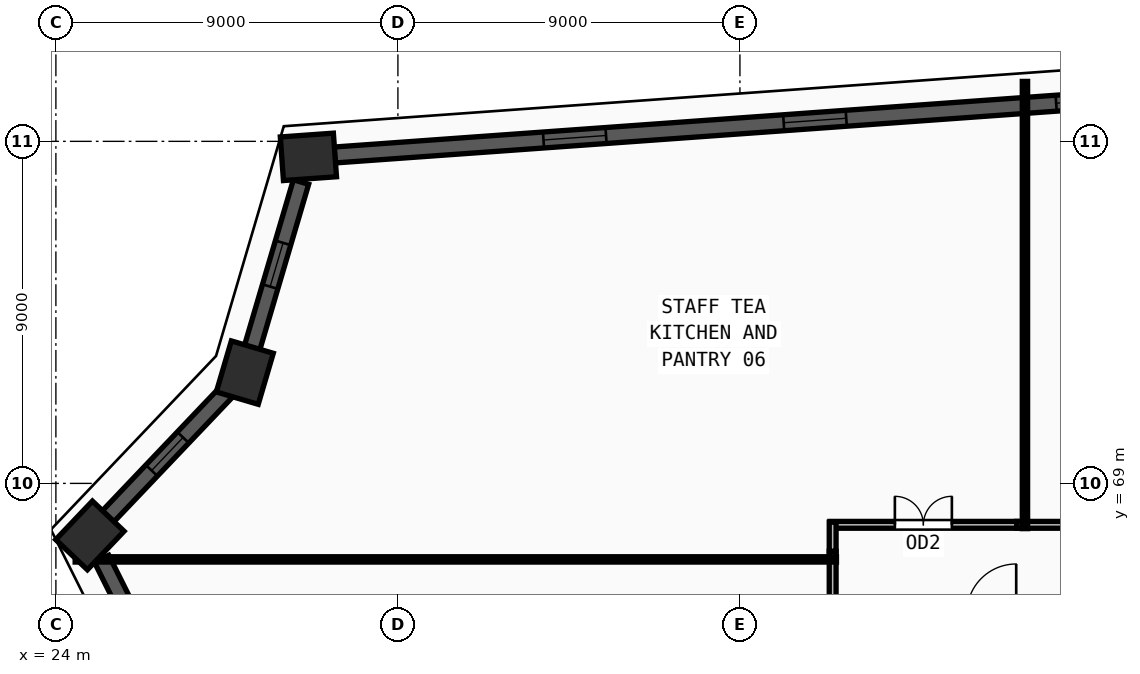
"""IFC4 building model, lengths in metres.
Left out: names, types, materials, properties, quantities, classifications, styles, units other than length and angle.
Written with IfcOpenShell. Run it as: python <this file> out.ifc"""

import sys

from ifc_helpers import new_model, si_unit, direction, frame, frame_2d, origin, origin_2d, place, context, subcontext, project, spatial, rectangle, extrude, source, transform, mapped, element, fill, save


model = new_model("IFC4")
c1 = context("Model", 3, precision=1e-05, world=origin(), true_north=direction((0.0, 1.0)))
c2 = subcontext(c1, "Body", "Model", "MODEL_VIEW")
j1 = project(units=[si_unit("LENGTHUNIT", "METRE"), si_unit("PLANEANGLEUNIT", "RADIAN")], contexts=[c1])
p1 = place(None, origin())
s1 = spatial("IfcSite", under=j1, at=p1, CompositionType="ELEMENT")
p2 = place(p1, origin())
s2 = spatial("IfcBuilding", under=s1, at=p2, CompositionType="ELEMENT")
p3 = place(p2, frame((0.0, 0.0, 155.25)))
s3 = spatial("IfcBuildingStorey", under=s2, at=p3, CompositionType="ELEMENT", Elevation=155.25)
m1 = source(origin(), c2, "Body", "SweptSolid", [
    extrude(rectangle(XDim=1.4, YDim=1.15, at=origin_2d()), origin(), (0.0, 0.0, 1.0), 3.75),
])
for number, where, z_axis, x_axis in (
    (1, (24.895, 67.631, 0.0), (0.0, 0.0, 1.0), (0.689, 0.724, 0.0)),
    (2, (28.971, 71.915, 0.0), (0.0, 0.0, 1.0), (0.283, 0.959, 0.0)),
    (3, (30.645, 77.592, 0.0), (0.0, 0.0, 1.0), (0.997, 0.071, 0.0)),
):
    element("IfcColumn", number, at=place(p3, frame(where, z_axis=z_axis, x_axis=x_axis)), inside=s3, PredefinedType="COLUMN", context=c2, shape_type="MappedRepresentation", body=[
        mapped(m1, transform((0.0, 0.0, 0.0), x_axis=(1.0, 0.0, 0.0), y_axis=(0.0, 1.0, 0.0), z_axis=(0.0, 0.0, 1.0), scale=1.0)),
    ])
p4 = place(p3, frame((56.617, 79.456, 0.0), z_axis=(0.0, 0.0, 1.0), x_axis=(-0.997433557859, -0.071598167967, 0.0)))
e4 = element("IfcWall", 4, at=p4, inside=s3, PredefinedType="SOLIDWALL", context=c2, shape_type="SweptSolid", body=[
    extrude(rectangle(XDim=25.349, YDim=0.42, at=frame_2d((12.674, 0.0))), origin(), (0.0, 0.0, 1.0), 3.57),
])
m2 = source(origin(), c2, "Body", "SweptSolid", [
    extrude(rectangle(XDim=1.65, YDim=1.95, at=frame_2d((0.825, 0.975))), frame((0.0, 0.22, 0.0), z_axis=(0.0, -1.0, 0.0), x_axis=(1.0, 0.0, 0.0)), (0.0, 0.0, 1.0), 0.44),
])
p5 = place(p4, frame((4.662, 0.0, 0.55)))
e5 = element("IfcOpeningElement", 5, at=p5, cuts=e4, PredefinedType="OPENING", context=c2, shape_type="MappedRepresentation", body=[
    mapped(m2, transform((0.0, 0.0, 0.0), x_axis=(1.0, 0.0, 0.0), y_axis=(0.0, 1.0, 0.0), z_axis=(0.0, 0.0, 1.0), scale=1.0)),
])
p6 = place(p4, frame((11.85, 0.0, 0.55)))
e6 = element("IfcOpeningElement", 6, at=p6, cuts=e4, PredefinedType="OPENING", context=c2, shape_type="MappedRepresentation", body=[
    mapped(m2, transform((0.0, 0.0, 0.0), x_axis=(1.0, 0.0, 0.0), y_axis=(0.0, 1.0, 0.0), z_axis=(0.0, 0.0, 1.0), scale=1.0)),
])
p7 = place(p4, frame((18.187, 0.0, 0.55)))
e7 = element("IfcOpeningElement", 7, at=p7, cuts=e4, PredefinedType="OPENING", context=c2, shape_type="MappedRepresentation", body=[
    mapped(m2, transform((0.0, 0.0, 0.0), x_axis=(1.0, 0.0, 0.0), y_axis=(0.0, 1.0, 0.0), z_axis=(0.0, 0.0, 1.0), scale=1.0)),
])
p8 = place(p3, frame((30.45, 76.93, 0.0), z_axis=(0.0, 0.0, 1.0), x_axis=(-0.282903082649, -0.959148500404, 0.0)))
e8 = element("IfcWall", 8, at=p8, inside=s3, PredefinedType="SOLIDWALL", context=c2, shape_type="SweptSolid", body=[
    extrude(rectangle(XDim=4.538, YDim=0.42, at=frame_2d((2.269, 0.0))), origin(), (0.0, 0.0, 1.0), 3.57),
])
m3 = source(origin(), c2, "Body", "SweptSolid", [
    extrude(rectangle(XDim=1.2, YDim=1.9, at=frame_2d((0.6, 0.95))), frame((0.0, 0.22, 0.0), z_axis=(0.0, -1.0, 0.0), x_axis=(1.0, 0.0, 0.0)), (0.0, 0.0, 1.0), 0.44),
])
p9 = place(p8, frame((1.669, 0.0, 0.55)))
e9 = element("IfcOpeningElement", 9, at=p9, cuts=e8, PredefinedType="OPENING", context=c2, shape_type="MappedRepresentation", body=[
    mapped(m3, transform((0.0, 0.0, 0.0), x_axis=(1.0, 0.0, 0.0), y_axis=(0.0, 1.0, 0.0), z_axis=(0.0, 0.0, 1.0), scale=1.0)),
])
p10 = place(p3, frame((28.495, 71.415, 0.0), z_axis=(0.0, 0.0, 1.0), x_axis=(-0.68924618139, -0.724527226155, 0.0)))
e10 = element("IfcWall", 10, at=p10, inside=s3, PredefinedType="SOLIDWALL", context=c2, shape_type="SweptSolid", body=[
    extrude(rectangle(XDim=4.532, YDim=0.42, at=frame_2d((2.266, 0.0))), origin(), (0.0, 0.0, 1.0), 3.57),
])
p11 = place(p10, frame((1.666, 0.0, 0.55)))
e11 = element("IfcOpeningElement", 11, at=p11, cuts=e10, PredefinedType="OPENING", context=c2, shape_type="MappedRepresentation", body=[
    mapped(m3, transform((0.0, 0.0, 0.0), x_axis=(1.0, 0.0, 0.0), y_axis=(0.0, 1.0, 0.0), z_axis=(0.0, 0.0, 1.0), scale=1.0)),
])
p12 = place(p3, frame((25.204, 67.014, 0.0), z_axis=(0.0, 0.0, 1.0), x_axis=(0.447340705753, -0.894363624583, 0.0)))
e12 = element("IfcWall", 12, at=p12, inside=s3, PredefinedType="SOLIDWALL", context=c2, shape_type="SweptSolid", body=[
    extrude(rectangle(XDim=30.73, YDim=0.42, at=frame_2d((15.365, 0.0))), origin(), (0.0, 0.0, 1.0), 3.57),
])
p13 = place(p12, frame((7.708, 0.0, 0.55)))
e13 = element("IfcOpeningElement", 13, at=p13, cuts=e12, PredefinedType="OPENING", context=c2, shape_type="MappedRepresentation", body=[
    mapped(m2, transform((0.0, 0.0, 0.0), x_axis=(1.0, 0.0, 0.0), y_axis=(0.0, 1.0, 0.0), z_axis=(0.0, 0.0, 1.0), scale=1.0)),
])
p14 = place(p12, frame((16.09, 0.0, 0.55)))
e14 = element("IfcOpeningElement", 14, at=p14, cuts=e12, PredefinedType="OPENING", context=c2, shape_type="MappedRepresentation", body=[
    mapped(m2, transform((0.0, 0.0, 0.0), x_axis=(1.0, 0.0, 0.0), y_axis=(0.0, 1.0, 0.0), z_axis=(0.0, 0.0, 1.0), scale=1.0)),
])
p15 = place(p12, frame((21.373, 0.0, 0.55)))
e15 = element("IfcOpeningElement", 15, at=p15, cuts=e12, PredefinedType="OPENING", context=c2, shape_type="MappedRepresentation", body=[
    mapped(m2, transform((0.0, 0.0, 0.0), x_axis=(1.0, 0.0, 0.0), y_axis=(0.0, 1.0, 0.0), z_axis=(0.0, 0.0, 1.0), scale=1.0)),
])
p16 = place(p3, frame((49.285, 67.91, 0.0), z_axis=(0.0, 0.0, 1.0), x_axis=(1.0, 0.0, 0.0)))
e16 = element("IfcWall", 16, at=p16, inside=s3, PredefinedType="PARTITIONING", context=c2, shape_type="SweptSolid", body=[
    extrude(rectangle(XDim=8.0, YDim=0.18, at=frame_2d((4.0, 0.0))), origin(), (0.0, 0.0, 1.0), 3.57),
])
m4 = source(origin(), c2, "Body", "SweptSolid", [
    extrude(rectangle(XDim=1.0, YDim=2.2, at=frame_2d((0.5, 1.1))), frame((0.0, 0.1, 0.0), z_axis=(0.0, -1.0, 0.0), x_axis=(1.0, 0.0, 0.0)), (0.0, 0.0, 1.0), 0.2),
])
p17 = place(p16, frame((3.5, 0.0, 0.0)))
e17 = element("IfcOpeningElement", 17, at=p17, cuts=e16, PredefinedType="OPENING", context=c2, shape_type="MappedRepresentation", body=[
    mapped(m4, transform((0.0, 0.0, 0.0), x_axis=(1.0, 0.0, 0.0), y_axis=(0.0, 1.0, 0.0), z_axis=(0.0, 0.0, 1.0), scale=1.0)),
])
p18 = place(p3, frame((44.37, 67.91, 0.0), z_axis=(0.0, 0.0, 1.0), x_axis=(1.0, 0.0, 0.0)))
e18 = element("IfcWall", 18, at=p18, inside=s3, PredefinedType="PARTITIONING", context=c2, shape_type="SweptSolid", body=[
    extrude(rectangle(XDim=4.915, YDim=0.18, at=frame_2d((2.458, 0.0))), origin(), (0.0, 0.0, 1.0), 3.57),
])
m5 = source(origin(), c2, "Body", "SweptSolid", [
    extrude(rectangle(XDim=1.5, YDim=2.2, at=frame_2d((0.75, 1.1))), frame((0.0, 0.1, 0.0), z_axis=(0.0, -1.0, 0.0), x_axis=(1.0, 0.0, 0.0)), (0.0, 0.0, 1.0), 0.2),
])
p19 = place(p18, frame((1.707, 0.0, 0.0)))
e19 = element("IfcOpeningElement", 19, at=p19, cuts=e18, PredefinedType="OPENING", context=c2, shape_type="MappedRepresentation", body=[
    mapped(m5, transform((0.0, 0.0, 0.0), x_axis=(1.0, 0.0, 0.0), y_axis=(0.0, 1.0, 0.0), z_axis=(0.0, 0.0, 1.0), scale=1.0)),
])
p20 = place(p3, frame((44.44, 60.785, 0.0), z_axis=(0.0, 0.0, 1.0), x_axis=(0.0, 1.0, 0.0)))
e20 = element("IfcWall", 20, at=p20, inside=s3, PredefinedType="PARTITIONING", context=c2, shape_type="SweptSolid", body=[
    extrude(rectangle(XDim=6.43, YDim=0.18, at=frame_2d((3.215, 0.0))), origin(), (0.0, 0.0, 1.0), 3.57),
])
p21 = place(p20, frame((2.715, 0.0, 0.0)))
e21 = element("IfcOpeningElement", 21, at=p21, cuts=e20, PredefinedType="OPENING", context=c2, shape_type="MappedRepresentation", body=[
    mapped(m4, transform((0.0, 0.0, 0.0), x_axis=(1.0, 0.0, 0.0), y_axis=(0.0, 1.0, 0.0), z_axis=(0.0, 0.0, 1.0), scale=1.0)),
])
p22 = place(p3, frame((44.44, 67.215, 0.0), z_axis=(0.0, 0.0, 1.0), x_axis=(0.0, 1.0, 0.0)))
e22 = element("IfcWall", 22, at=p22, inside=s3, PredefinedType="PARTITIONING", context=c2, shape_type="SweptSolid", body=[
    extrude(rectangle(XDim=0.765, YDim=0.18, at=frame_2d((0.382, 0.0))), origin(), (0.0, 0.0, 1.0), 3.57),
])
p23 = place(p3, frame((44.54, 67.0, 0.0), z_axis=(0.0, 0.0, 1.0), x_axis=(-1.0, 0.0, 0.0)))
e23 = element("IfcWall", 23, at=p23, inside=s3, PredefinedType="PARTITIONING", context=c2, shape_type="SweptSolid", body=[
    extrude(rectangle(XDim=20.033, YDim=0.14, at=frame_2d((10.017, 0.0))), origin(), (0.0, 0.0, 1.0), 2.755),
])
p24 = place(p3, frame((49.5, 67.81, 0.0), z_axis=(0.0, 0.0, 1.0), x_axis=(0.0, 1.0, 0.0)))
e24 = element("IfcWall", 24, at=p24, inside=s3, PredefinedType="PARTITIONING", context=c2, shape_type="SweptSolid", body=[
    extrude(rectangle(XDim=11.767, YDim=0.14, at=frame_2d((5.883, 0.0))), origin(), (0.0, 0.0, 1.0), 3.57),
])
m6 = source(origin(), c2, "Body", "SweptSolid", [
    extrude(rectangle(XDim=1.65, YDim=1.95, at=frame_2d((0.825, 0.975))), frame((0.0, 0.03, 0.0), z_axis=(0.0, -1.0, 0.0), x_axis=(1.0, 0.0, 0.0)), (0.0, 0.0, 1.0), 0.06),
])
p25 = place(p5, origin())
e25 = element("IfcWindow", 25, at=p25, inside=s3, PartitioningType="DOUBLE_PANEL_VERTICAL", PredefinedType="WINDOW", context=c2, shape_type="MappedRepresentation", body=[
    mapped(m6, transform((0.0, 0.0, 0.0), x_axis=(1.0, 0.0, 0.0), y_axis=(0.0, 1.0, 0.0), z_axis=(0.0, 0.0, 1.0), scale=1.0)),
])
fill(e5, e25)
p26 = place(p6, origin())
e26 = element("IfcWindow", 26, at=p26, inside=s3, PartitioningType="DOUBLE_PANEL_VERTICAL", PredefinedType="WINDOW", context=c2, shape_type="MappedRepresentation", body=[
    mapped(m6, transform((0.0, 0.0, 0.0), x_axis=(1.0, 0.0, 0.0), y_axis=(0.0, 1.0, 0.0), z_axis=(0.0, 0.0, 1.0), scale=1.0)),
])
fill(e6, e26)
p27 = place(p7, origin())
e27 = element("IfcWindow", 27, at=p27, inside=s3, PartitioningType="DOUBLE_PANEL_VERTICAL", PredefinedType="WINDOW", context=c2, shape_type="MappedRepresentation", body=[
    mapped(m6, transform((0.0, 0.0, 0.0), x_axis=(1.0, 0.0, 0.0), y_axis=(0.0, 1.0, 0.0), z_axis=(0.0, 0.0, 1.0), scale=1.0)),
])
fill(e7, e27)
m7 = source(origin(), c2, "Body", "SweptSolid", [
    extrude(rectangle(XDim=1.2, YDim=1.9, at=frame_2d((0.6, 0.95))), frame((0.0, 0.03, 0.0), z_axis=(0.0, -1.0, 0.0), x_axis=(1.0, 0.0, 0.0)), (0.0, 0.0, 1.0), 0.06),
])
p28 = place(p9, origin())
e28 = element("IfcWindow", 28, at=p28, inside=s3, PartitioningType="SINGLE_PANEL", PredefinedType="WINDOW", context=c2, shape_type="MappedRepresentation", body=[
    mapped(m7, transform((0.0, 0.0, 0.0), x_axis=(1.0, 0.0, 0.0), y_axis=(0.0, 1.0, 0.0), z_axis=(0.0, 0.0, 1.0), scale=1.0)),
])
fill(e9, e28)
p29 = place(p11, origin())
e29 = element("IfcWindow", 29, at=p29, inside=s3, PartitioningType="SINGLE_PANEL", PredefinedType="WINDOW", context=c2, shape_type="MappedRepresentation", body=[
    mapped(m7, transform((0.0, 0.0, 0.0), x_axis=(1.0, 0.0, 0.0), y_axis=(0.0, 1.0, 0.0), z_axis=(0.0, 0.0, 1.0), scale=1.0)),
])
fill(e11, e29)
m8 = source(origin(), c2, "Body", "SweptSolid", [
    extrude(rectangle(XDim=1.5, YDim=2.2, at=frame_2d((0.75, 1.1))), frame((0.0, 0.025, 0.0), z_axis=(0.0, -1.0, 0.0), x_axis=(1.0, 0.0, 0.0)), (0.0, 0.0, 1.0), 0.05),
])
p30 = place(p19, origin())
e30 = element("IfcDoor", 30, at=p30, inside=s3, OperationType="DOUBLE_DOOR_SINGLE_SWING", PredefinedType="DOOR", context=c2, shape_type="MappedRepresentation", body=[
    mapped(m8, transform((0.0, 0.0, 0.0), x_axis=(1.0, 0.0, 0.0), y_axis=(0.0, 1.0, 0.0), z_axis=(0.0, 0.0, 1.0), scale=1.0)),
])
fill(e19, e30)
save(model, sys.argv[1])
